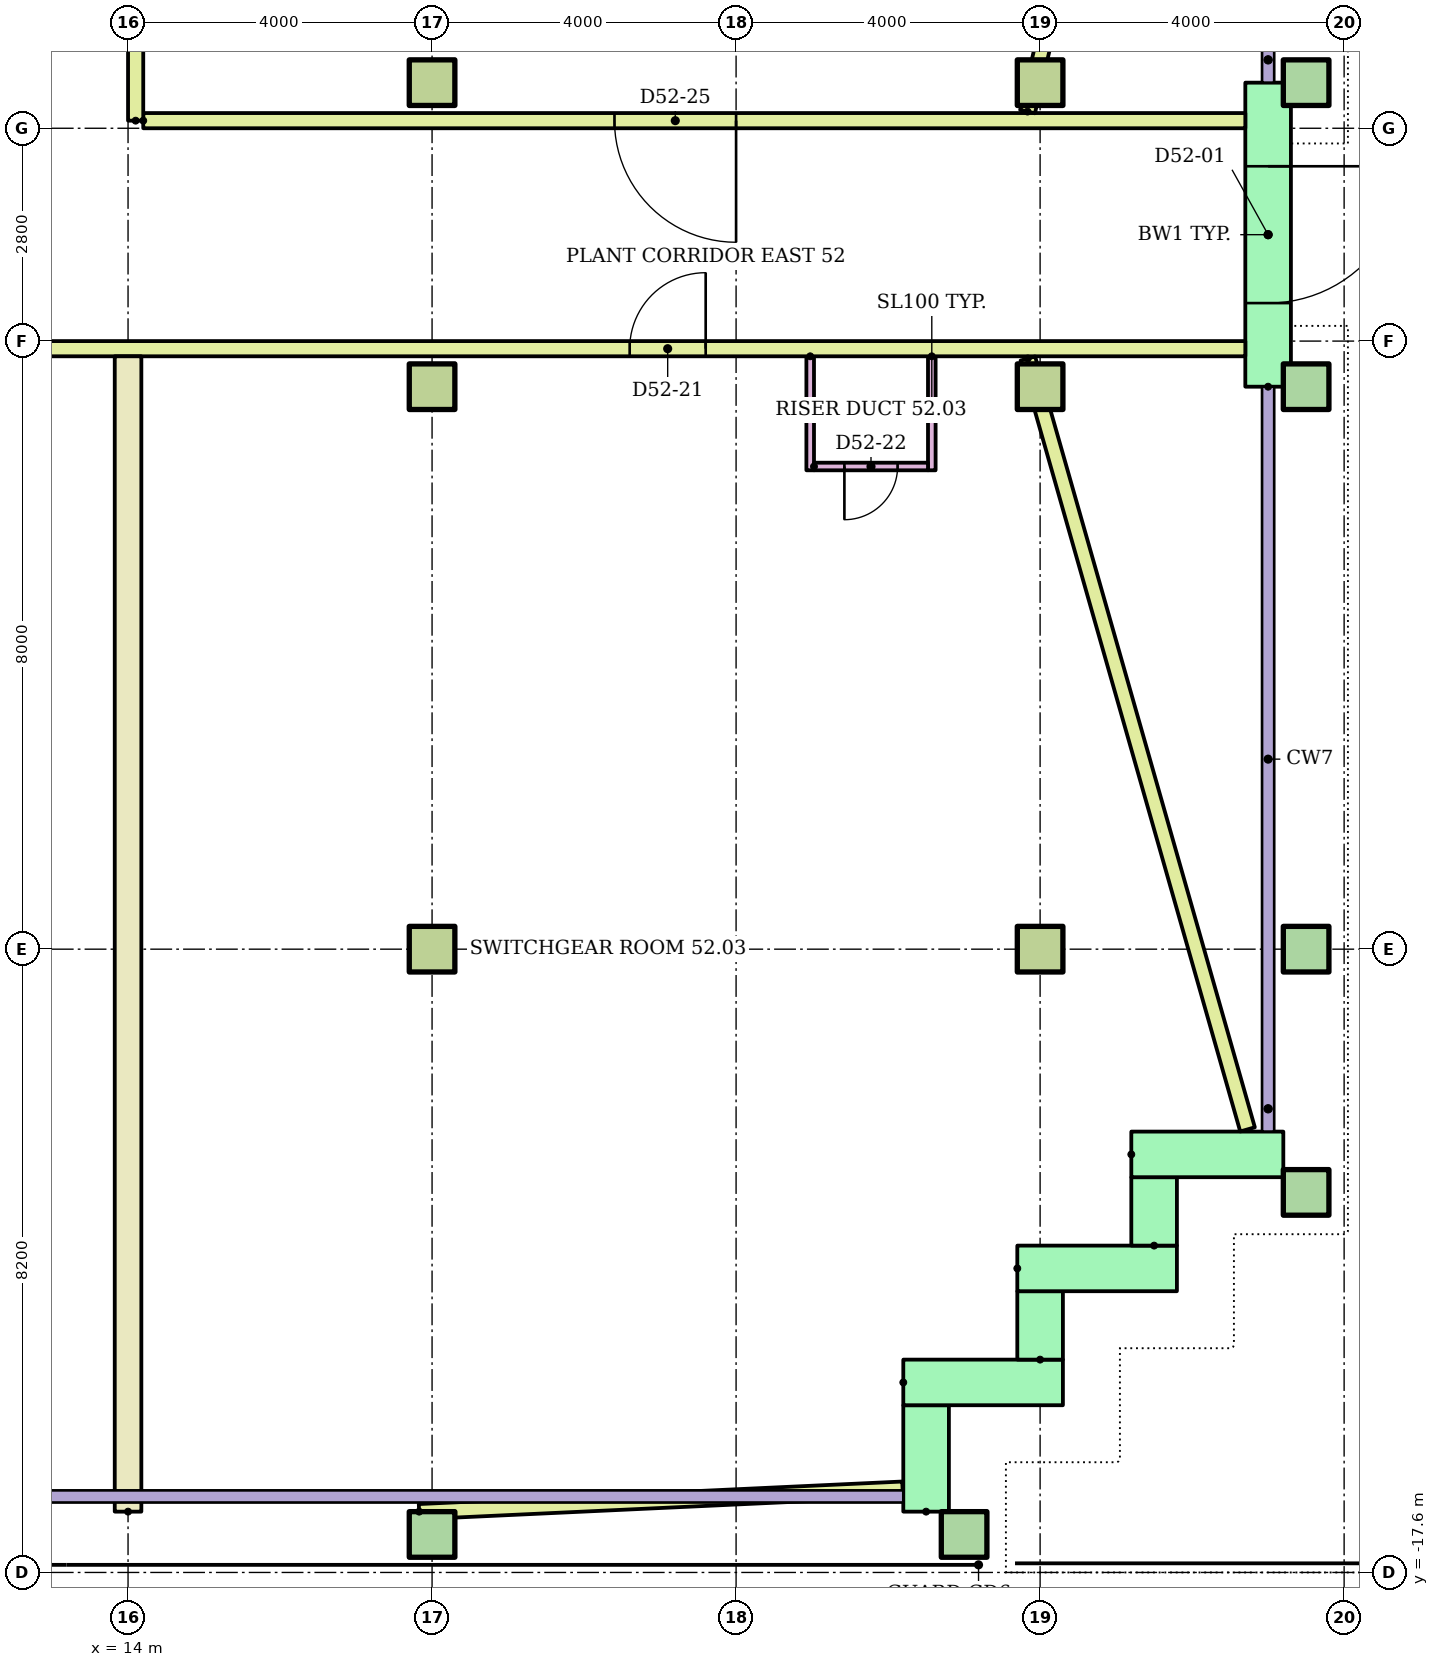
"""IFC4 building model, lengths in metres.
Left out: names, types, materials, properties, quantities, classifications, styles, units other than length and angle.
Written with IfcOpenShell. Run it as: python <this file> out.ifc"""

import sys

from ifc_helpers import new_model, si_unit, direction, frame, frame_2d, origin, origin_2d, place, context, subcontext, project, spatial, rectangle, hollow_rectangle, extrude, element, fill, save


model = new_model("IFC4")
c1 = context("Model", 3, precision=1e-05, world=origin(), true_north=direction((0.0, 1.0)))
c2 = subcontext(c1, "Body", "Model", "MODEL_VIEW")
j1 = project(units=[si_unit("LENGTHUNIT", "METRE"), si_unit("PLANEANGLEUNIT", "RADIAN")], contexts=[c1])
p1 = place(None, origin())
s1 = spatial("IfcSite", under=j1, at=p1, CompositionType="ELEMENT")
p2 = place(p1, origin())
s2 = spatial("IfcBuilding", under=s1, at=p2, CompositionType="ELEMENT")
p3 = place(p2, frame((0.0, 0.0, 203.7)))
s3 = spatial("IfcBuildingStorey", under=s2, at=p3, CompositionType="ELEMENT", Elevation=203.7)
for number, where in (
    (1, (18.0, -17.1, 0.0)),
    (2, (25.0, -17.1, 0.0)),
    (3, (29.5, -12.6, 0.0)),
):
    element("IfcColumn", number, at=place(p3, frame(where)), inside=s3, PredefinedType="COLUMN", context=c2, shape_type="SweptSolid", body=[
        extrude(hollow_rectangle(XDim=0.6, YDim=0.6, WallThickness=0.03, at=origin_2d()), origin(), (0.0, 0.0, 1.0), 3.9),
    ])
for number, where in (
    (4, (18.0, -9.4, 0.0)),
    (5, (26.0, -9.4, 0.0)),
):
    element("IfcColumn", number, at=place(p3, frame(where)), inside=s3, PredefinedType="COLUMN", context=c2, shape_type="SweptSolid", body=[
        extrude(rectangle(XDim=0.6, YDim=0.6, at=origin_2d()), origin(), (0.0, 0.0, 1.0), 3.9),
    ])
p4 = place(p3, frame((29.5, -9.4, 0.0)))
e6 = element("IfcColumn", 6, at=p4, inside=s3, PredefinedType="COLUMN", context=c2, shape_type="SweptSolid", body=[
    extrude(hollow_rectangle(XDim=0.6, YDim=0.6, WallThickness=0.03, at=origin_2d()), origin(), (0.0, 0.0, 1.0), 3.9),
])
for number, where in (
    (7, (18.0, -2.0, 0.0)),
    (8, (26.0, -2.0, 0.0)),
):
    element("IfcColumn", number, at=place(p3, frame(where)), inside=s3, PredefinedType="COLUMN", context=c2, shape_type="SweptSolid", body=[
        extrude(rectangle(XDim=0.6, YDim=0.6, at=origin_2d()), origin(), (0.0, 0.0, 1.0), 3.9),
    ])
p5 = place(p3, frame((29.5, -2.0, 0.0)))
e9 = element("IfcColumn", 9, at=p5, inside=s3, PredefinedType="COLUMN", context=c2, shape_type="SweptSolid", body=[
    extrude(hollow_rectangle(XDim=0.6, YDim=0.6, WallThickness=0.03, at=origin_2d()), origin(), (0.0, 0.0, 1.0), 3.9),
])
for number, where in (
    (10, (18.0, 2.0, 0.0)),
    (11, (26.0, 2.0, 0.0)),
):
    element("IfcColumn", number, at=place(p3, frame(where)), inside=s3, PredefinedType="COLUMN", context=c2, shape_type="SweptSolid", body=[
        extrude(rectangle(XDim=0.6, YDim=0.6, at=origin_2d()), origin(), (0.0, 0.0, 1.0), 3.9),
    ])
p6 = place(p3, frame((29.5, 2.0, 0.0)))
e12 = element("IfcColumn", 12, at=p6, inside=s3, PredefinedType="COLUMN", context=c2, shape_type="SweptSolid", body=[
    extrude(hollow_rectangle(XDim=0.6, YDim=0.6, WallThickness=0.03, at=origin_2d()), origin(), (0.0, 0.0, 1.0), 3.9),
])
p7 = place(p3, frame((24.5, -16.8, 0.0), z_axis=(0.0, 0.0, 1.0), x_axis=(0.0, 1.0, 0.0)))
e13 = element("IfcWall", 13, at=p7, inside=s3, PredefinedType="STANDARD", context=c2, shape_type="SweptSolid", body=[
    extrude(rectangle(XDim=1.4, YDim=0.6, at=frame_2d((0.7, 0.0))), origin(), (0.0, 0.0, 1.0), 3.62),
])
p8 = place(p3, frame((24.2, -15.1, 0.0)))
e14 = element("IfcWall", 14, at=p8, inside=s3, PredefinedType="STANDARD", context=c2, shape_type="SweptSolid", body=[
    extrude(rectangle(XDim=2.1, YDim=0.6, at=frame_2d((1.05, 0.0))), origin(), (0.0, 0.0, 1.0), 3.62),
])
p9 = place(p3, frame((26.0, -14.8, 0.0), z_axis=(0.0, 0.0, 1.0), x_axis=(0.0, 1.0, 0.0)))
e15 = element("IfcWall", 15, at=p9, inside=s3, PredefinedType="STANDARD", context=c2, shape_type="SweptSolid", body=[
    extrude(rectangle(XDim=0.9, YDim=0.6, at=frame_2d((0.45, 0.0))), origin(), (0.0, 0.0, 1.0), 3.62),
])
p10 = place(p3, frame((25.7, -13.6, 0.0)))
e16 = element("IfcWall", 16, at=p10, inside=s3, PredefinedType="STANDARD", context=c2, shape_type="SweptSolid", body=[
    extrude(rectangle(XDim=2.1, YDim=0.6, at=frame_2d((1.05, 0.0))), origin(), (0.0, 0.0, 1.0), 3.62),
])
p11 = place(p3, frame((27.5, -13.3, 0.0), z_axis=(0.0, 0.0, 1.0), x_axis=(0.0, 1.0, 0.0)))
e17 = element("IfcWall", 17, at=p11, inside=s3, PredefinedType="STANDARD", context=c2, shape_type="SweptSolid", body=[
    extrude(rectangle(XDim=0.9, YDim=0.6, at=frame_2d((0.45, 0.0))), origin(), (0.0, 0.0, 1.0), 3.62),
])
p12 = place(p3, frame((27.2, -12.1, 0.0)))
e18 = element("IfcWall", 18, at=p12, inside=s3, PredefinedType="STANDARD", context=c2, shape_type="SweptSolid", body=[
    extrude(rectangle(XDim=2.0, YDim=0.6, at=frame_2d((1.0, 0.0))), origin(), (0.0, 0.0, 1.0), 3.62),
])
p13 = place(p3, frame((29.0, -2.0, 0.0), z_axis=(0.0, 0.0, 1.0), x_axis=(0.0, 1.0, 0.0)))
e19 = element("IfcWall", 19, at=p13, inside=s3, PredefinedType="STANDARD", context=c2, shape_type="SweptSolid", body=[
    extrude(rectangle(XDim=4.0, YDim=0.6, at=frame_2d((2.0, 0.0))), origin(), (0.0, 0.0, 1.0), 3.62),
])
p14 = place(p13, frame((1.1, 0.0, 0.0)))
e20 = element("IfcOpeningElement", 20, at=p14, cuts=e19, PredefinedType="OPENING", context=c2, shape_type="SweptSolid", body=[
    extrude(rectangle(XDim=1.8, YDim=2.1, at=frame_2d((0.9, 1.05))), frame((0.0, 0.31, 0.0), z_axis=(0.0, -1.0, 0.0), x_axis=(1.0, 0.0, 0.0)), (0.0, 0.0, 1.0), 0.62),
])
p15 = place(p3, frame((-29.2, -1.5, 0.0)))
e21 = element("IfcWall", 21, at=p15, inside=s3, PredefinedType="PARTITIONING", context=c2, shape_type="SweptSolid", body=[
    extrude(rectangle(XDim=57.9, YDim=0.2, at=frame_2d((28.95, 0.0))), origin(), (0.0, 0.0, 1.0), 3.62),
])
p16 = place(p15, frame((20.8, 0.0, 0.0)))
e22 = element("IfcOpeningElement", 22, at=p16, cuts=e21, PredefinedType="OPENING", context=c2, shape_type="SweptSolid", body=[
    extrude(rectangle(XDim=1.5, YDim=2.1, at=frame_2d((0.75, 1.05))), frame((0.0, 0.11, 0.0), z_axis=(0.0, -1.0, 0.0), x_axis=(1.0, 0.0, 0.0)), (0.0, 0.0, 1.0), 0.22),
])
p17 = place(p15, frame((35.4, 0.0, 0.0)))
e23 = element("IfcOpeningElement", 23, at=p17, cuts=e21, PredefinedType="OPENING", context=c2, shape_type="SweptSolid", body=[
    extrude(rectangle(XDim=1.5, YDim=2.1, at=frame_2d((0.75, 1.05))), frame((0.0, 0.11, 0.0), z_axis=(0.0, -1.0, 0.0), x_axis=(1.0, 0.0, 0.0)), (0.0, 0.0, 1.0), 0.22),
])
p18 = place(p15, frame((49.8, 0.0, 0.0)))
e24 = element("IfcOpeningElement", 24, at=p18, cuts=e21, PredefinedType="OPENING", context=c2, shape_type="SweptSolid", body=[
    extrude(rectangle(XDim=1.0, YDim=2.4, at=frame_2d((0.5, 1.2))), frame((0.0, 0.11, 0.0), z_axis=(0.0, -1.0, 0.0), x_axis=(1.0, 0.0, 0.0)), (0.0, 0.0, 1.0), 0.22),
])
p19 = place(p15, frame((8.0, 0.0, 0.0)))
e25 = element("IfcOpeningElement", 25, at=p19, cuts=e21, PredefinedType="OPENING", context=c2, shape_type="SweptSolid", body=[
    extrude(rectangle(XDim=1.6, YDim=2.4, at=frame_2d((0.8, 1.2))), frame((0.0, 0.11, 0.0), z_axis=(0.0, -1.0, 0.0), x_axis=(1.0, 0.0, 0.0)), (0.0, 0.0, 1.0), 0.22),
])
p20 = place(p3, frame((14.2, 1.5, 0.0)))
e26 = element("IfcWall", 26, at=p20, inside=s3, PredefinedType="PARTITIONING", context=c2, shape_type="SweptSolid", body=[
    extrude(rectangle(XDim=14.5, YDim=0.2, at=frame_2d((7.25, 0.0))), origin(), (0.0, 0.0, 1.0), 3.62),
])
p21 = place(p20, frame((6.2, 0.0, 0.0)))
e27 = element("IfcOpeningElement", 27, at=p21, cuts=e26, PredefinedType="OPENING", context=c2, shape_type="SweptSolid", body=[
    extrude(rectangle(XDim=1.6, YDim=2.4, at=frame_2d((0.8, 1.2))), frame((0.0, 0.11, 0.0), z_axis=(0.0, -1.0, 0.0), x_axis=(1.0, 0.0, 0.0)), (0.0, 0.0, 1.0), 0.22),
])
p22 = place(p3, frame((14.1, 1.5, 0.0), z_axis=(0.0, 0.0, 1.0), x_axis=(0.0, 1.0, 0.0)))
e28 = element("IfcWall", 28, at=p22, inside=s3, PredefinedType="PARTITIONING", context=c2, shape_type="SweptSolid", body=[
    extrude(rectangle(XDim=1.5, YDim=0.2, at=frame_2d((0.75, 0.0))), origin(), (0.0, 0.0, 1.0), 3.62),
])
for number, where, z_axis, x_axis in (
    (29, (22.975, -1.6, 0.0), (0.0, 0.0, 1.0), (0.0, -1.0, 0.0)),
    (30, (24.575, -1.6, 0.0), (0.0, 0.0, 1.0), (0.0, -1.0, 0.0)),
):
    element("IfcWall", number, at=place(p3, frame(where, z_axis=z_axis, x_axis=x_axis)), inside=s3, PredefinedType="PARTITIONING", context=c2, shape_type="SweptSolid", body=[
        extrude(rectangle(XDim=1.5, YDim=0.1, at=frame_2d((0.75, 0.0))), origin(), (0.0, 0.0, 1.0), 3.62),
    ])
p23 = place(p3, frame((23.025, -3.05, 0.0)))
e31 = element("IfcWall", 31, at=p23, inside=s3, PredefinedType="PARTITIONING", context=c2, shape_type="SweptSolid", body=[
    extrude(rectangle(XDim=1.5, YDim=0.1, at=frame_2d((0.75, 0.0))), origin(), (0.0, 0.0, 1.0), 3.62),
])
p24 = place(p23, frame((0.4, 0.0, 0.0)))
e32 = element("IfcOpeningElement", 32, at=p24, cuts=e31, PredefinedType="OPENING", context=c2, shape_type="SweptSolid", body=[
    extrude(rectangle(XDim=0.7, YDim=2.0, at=frame_2d((0.35, 1.0))), frame((0.0, 0.06, 0.0), z_axis=(0.0, -1.0, 0.0), x_axis=(1.0, 0.0, 0.0)), (0.0, 0.0, 1.0), 0.12),
])
p25 = place(p3, frame((17.83, -16.8, 0.0), z_axis=(0.0, 0.0, 1.0), x_axis=(0.998916109623, 0.046546814458, 0.0)))
e33 = element("IfcWall", 33, at=p25, inside=s3, PredefinedType="PARTITIONING", context=c2, shape_type="SweptSolid", body=[
    extrude(rectangle(XDim=6.367, YDim=0.2, at=frame_2d((3.184, 0.0))), origin(), (0.0, 0.0, 1.0), 3.62),
])
p26 = place(p3, frame((25.838, -1.629, 0.0), z_axis=(0.0, 0.0, 1.0), x_axis=(0.274140148354, -0.961689751978, 0.0)))
e34 = element("IfcWall", 34, at=p26, inside=s3, PredefinedType="PARTITIONING", context=c2, shape_type="SweptSolid", body=[
    extrude(rectangle(XDim=10.546, YDim=0.2, at=frame_2d((5.273, 0.0))), origin(), (0.0, 0.0, 1.0), 3.62),
])
p27 = place(p3, frame((14.0, -16.8, 0.0), z_axis=(0.0, 0.0, 1.0), x_axis=(0.0, 1.0, 0.0)))
e35 = element("IfcWall", 35, at=p27, inside=s3, PredefinedType="PARTITIONING", context=c2, shape_type="SweptSolid", body=[
    extrude(rectangle(XDim=15.2, YDim=0.35, at=frame_2d((7.6, 0.0))), origin(), (0.0, 0.0, 1.0), 3.62),
])
p28 = place(p3, frame((25.834, 1.619, 0.0), z_axis=(0.0, 0.0, 1.0), x_axis=(0.226758161526, 0.973951095375, 0.0)))
e36 = element("IfcWall", 36, at=p28, inside=s3, PredefinedType="PARTITIONING", context=c2, shape_type="SweptSolid", body=[
    extrude(rectangle(XDim=12.9, YDim=0.2, at=frame_2d((6.45, 0.0))), origin(), (0.0, 0.0, 1.0), 3.62),
])
p29 = place(p14, frame((1.8, 0.0, 0.0), z_axis=(0.0, 0.0, 1.0), x_axis=(-1.0, 0.0, 0.0)))
e37 = element("IfcDoor", 37, at=p29, inside=s3, OperationType="DOUBLE_DOOR_SINGLE_SWING", PredefinedType="DOOR", context=c2, shape_type="SweptSolid", body=[
    extrude(rectangle(XDim=1.8, YDim=2.1, at=frame_2d((0.9, 1.05))), frame((0.0, 0.025, 0.0), z_axis=(0.0, -1.0, 0.0), x_axis=(1.0, 0.0, 0.0)), (0.0, 0.0, 1.0), 0.05),
])
fill(e20, e37)
p30 = place(p18, origin())
e38 = element("IfcDoor", 38, at=p30, inside=s3, OperationType="SINGLE_SWING_RIGHT", PredefinedType="DOOR", context=c2, shape_type="SweptSolid", body=[
    extrude(rectangle(XDim=1.0, YDim=2.4, at=frame_2d((0.5, 1.2))), frame((0.0, 0.025, 0.0), z_axis=(0.0, -1.0, 0.0), x_axis=(1.0, 0.0, 0.0)), (0.0, 0.0, 1.0), 0.05),
])
fill(e24, e38)
p31 = place(p24, frame((0.7, 0.0, 0.0), z_axis=(0.0, 0.0, 1.0), x_axis=(-1.0, 0.0, 0.0)))
e39 = element("IfcDoor", 39, at=p31, inside=s3, OperationType="SINGLE_SWING_LEFT", PredefinedType="DOOR", context=c2, shape_type="SweptSolid", body=[
    extrude(rectangle(XDim=0.7, YDim=2.0, at=frame_2d((0.35, 1.0))), frame((0.0, 0.025, 0.0), z_axis=(0.0, -1.0, 0.0), x_axis=(1.0, 0.0, 0.0)), (0.0, 0.0, 1.0), 0.05),
])
fill(e32, e39)
p32 = place(p21, frame((1.6, 0.0, 0.0), z_axis=(0.0, 0.0, 1.0), x_axis=(-1.0, 0.0, 0.0)))
e40 = element("IfcDoor", 40, at=p32, inside=s3, OperationType="DOUBLE_DOOR_SINGLE_SWING", PredefinedType="DOOR", context=c2, shape_type="SweptSolid", body=[
    extrude(rectangle(XDim=1.6, YDim=2.4, at=frame_2d((0.8, 1.2))), frame((0.0, 0.025, 0.0), z_axis=(0.0, -1.0, 0.0), x_axis=(1.0, 0.0, 0.0)), (0.0, 0.0, 1.0), 0.05),
])
fill(e27, e40)
save(model, sys.argv[1])
